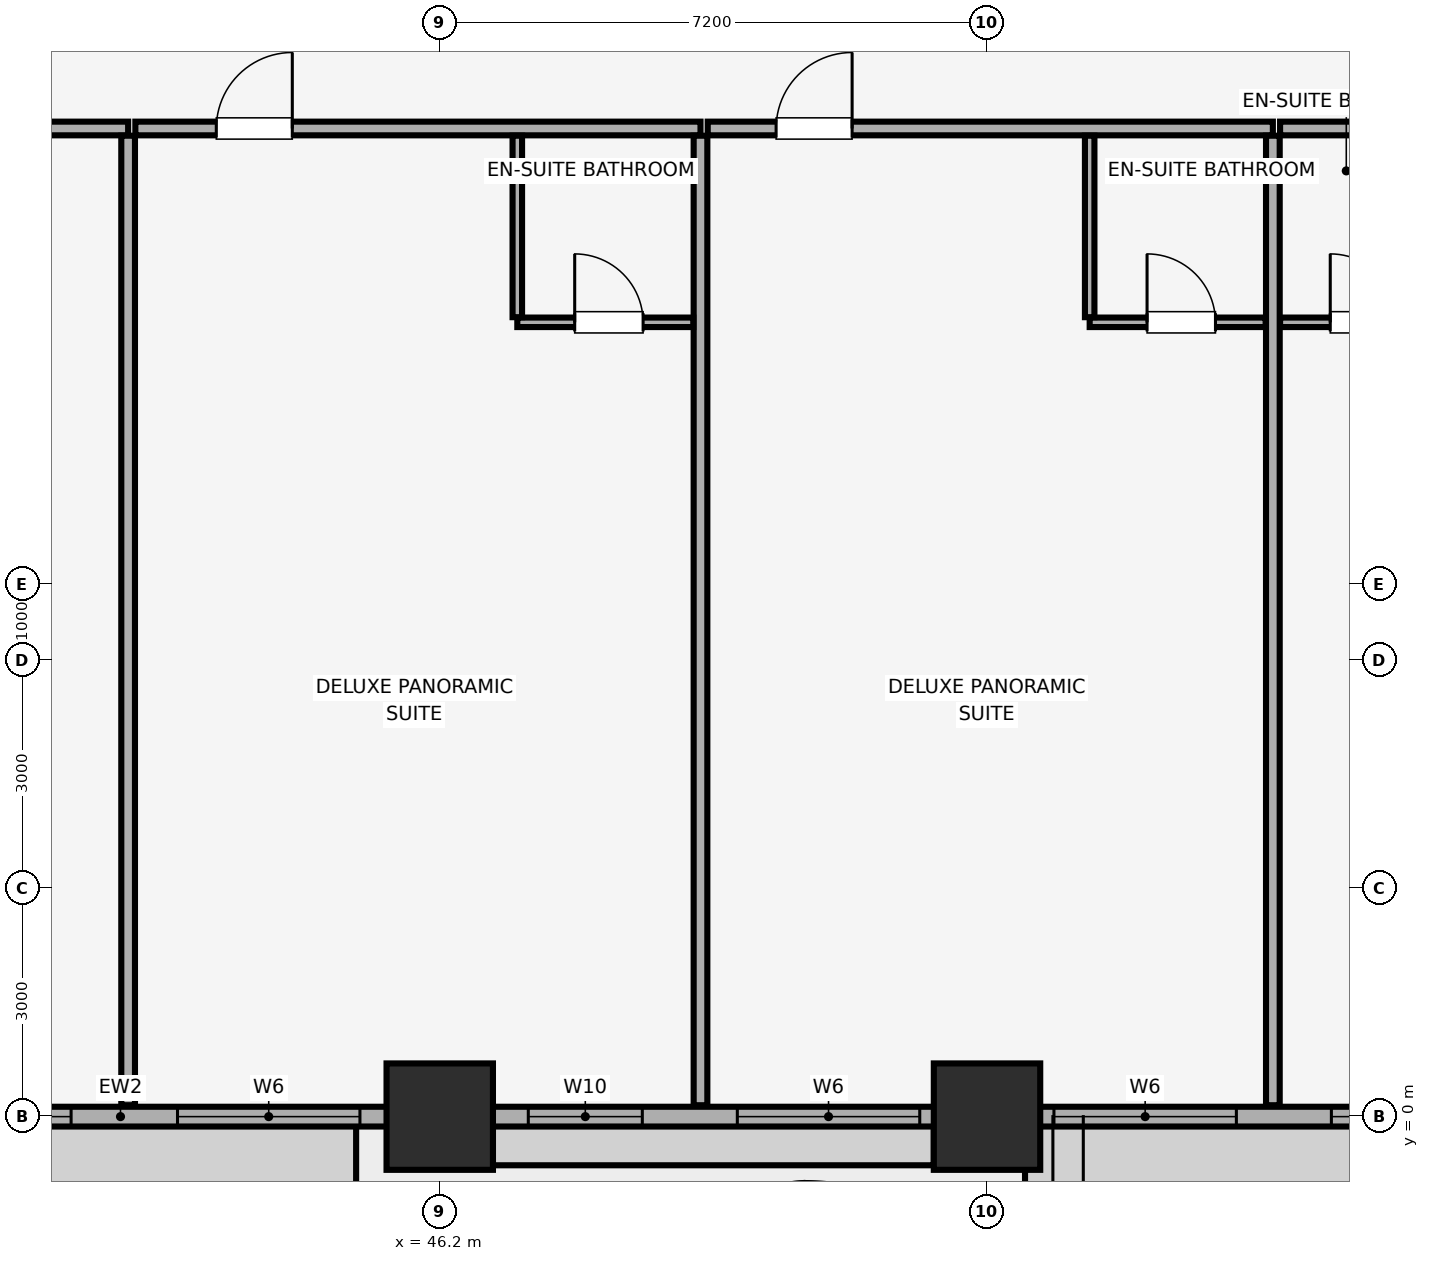
"""IFC4 building model, lengths in metres.
Left out: names, types, materials, properties, quantities, classifications, styles, units other than length and angle.
Written with IfcOpenShell. Run it as: python <this file> out.ifc"""

import sys

from ifc_helpers import new_model, si_unit, direction, frame, frame_2d, origin, origin_2d, place, context, subcontext, project, spatial, rectangle, extrude, element, fill, save


model = new_model("IFC4")
c1 = context("Model", 3, precision=1e-05, world=origin(), true_north=direction((0.0, 1.0)))
c2 = subcontext(c1, "Body", "Model", "MODEL_VIEW")
j1 = project(units=[si_unit("LENGTHUNIT", "METRE"), si_unit("PLANEANGLEUNIT", "RADIAN")], contexts=[c1])
p1 = place(None, origin())
s1 = spatial("IfcSite", under=j1, at=p1, CompositionType="ELEMENT")
p2 = place(p1, origin())
s2 = spatial("IfcBuilding", under=s1, at=p2, CompositionType="ELEMENT")
p3 = place(p2, frame((0.0, 0.0, 68.9)))
s3 = spatial("IfcBuildingStorey", under=s2, at=p3, CompositionType="ELEMENT", Elevation=68.9)
for number, where, z_axis, x_axis in (
    (1, (46.2, 0.0, 0.0), (0.0, 0.0, 1.0), (1.0, 0.0, 0.0)),
    (2, (53.4, 0.0, 0.0), (0.0, 0.0, 1.0), (1.0, 0.0, 0.0)),
):
    element("IfcColumn", number, at=place(p3, frame(where, z_axis=z_axis, x_axis=x_axis)), inside=s3, PredefinedType="COLUMN", context=c2, shape_type="SweptSolid", body=[
        extrude(rectangle(XDim=1.4, YDim=1.4, at=origin_2d()), origin(), (0.0, 0.0, 1.0), 3.51),
    ])
p4 = place(p3, frame((4.2, 0.0, 0.0), z_axis=(0.0, 0.0, 1.0), x_axis=(1.0, 0.0, 0.0)))
e3 = element("IfcWall", 3, at=p4, inside=s3, PredefinedType="SOLIDWALL", context=c2, shape_type="SweptSolid", body=[
    extrude(rectangle(XDim=75.6, YDim=0.26, at=frame_2d((37.8, 0.0))), origin(), (0.0, 0.0, 1.0), 2.56),
])
p5 = place(p4, frame((13.517, 0.0, 0.0)))
e4 = element("IfcOpeningElement", 4, at=p5, cuts=e3, PredefinedType="OPENING", context=c2, shape_type="SweptSolid", body=[
    extrude(rectangle(XDim=1.1, YDim=2.15, at=frame_2d((0.55, 1.075))), frame((0.0, 0.14, 0.0), z_axis=(0.0, -1.0, 0.0), x_axis=(1.0, 0.0, 0.0)), (0.0, 0.0, 1.0), 0.28),
])
p6 = place(p4, frame((28.183, 0.0, 0.0)))
e5 = element("IfcOpeningElement", 5, at=p6, cuts=e3, PredefinedType="OPENING", context=c2, shape_type="SweptSolid", body=[
    extrude(rectangle(XDim=1.1, YDim=2.15, at=frame_2d((0.55, 1.075))), frame((0.0, 0.14, 0.0), z_axis=(0.0, -1.0, 0.0), x_axis=(1.0, 0.0, 0.0)), (0.0, 0.0, 1.0), 0.28),
])
p7 = place(p4, frame((58.094, 0.0, 0.0)))
e6 = element("IfcOpeningElement", 6, at=p7, cuts=e3, PredefinedType="OPENING", context=c2, shape_type="SweptSolid", body=[
    extrude(rectangle(XDim=1.1, YDim=2.15, at=frame_2d((0.55, 1.075))), frame((0.0, 0.14, 0.0), z_axis=(0.0, -1.0, 0.0), x_axis=(1.0, 0.0, 0.0)), (0.0, 0.0, 1.0), 0.28),
])
p8 = place(p4, frame((1.035, 0.0, 0.85)))
e7 = element("IfcOpeningElement", 7, at=p8, cuts=e3, PredefinedType="OPENING", context=c2, shape_type="SweptSolid", body=[
    extrude(rectangle(XDim=2.4, YDim=1.5, at=frame_2d((1.2, 0.75))), frame((0.0, 0.14, 0.0), z_axis=(0.0, -1.0, 0.0), x_axis=(1.0, 0.0, 0.0)), (0.0, 0.0, 1.0), 0.28),
])
p9 = place(p4, frame((5.74, 0.0, 0.85)))
e8 = element("IfcOpeningElement", 8, at=p9, cuts=e3, PredefinedType="OPENING", context=c2, shape_type="SweptSolid", body=[
    extrude(rectangle(XDim=1.5, YDim=1.4, at=frame_2d((0.75, 0.7))), frame((0.0, 0.14, 0.0), z_axis=(0.0, -1.0, 0.0), x_axis=(1.0, 0.0, 0.0)), (0.0, 0.0, 1.0), 0.28),
])
p10 = place(p4, frame((8.49, 0.0, 0.85)))
e9 = element("IfcOpeningElement", 9, at=p10, cuts=e3, PredefinedType="OPENING", context=c2, shape_type="SweptSolid", body=[
    extrude(rectangle(XDim=2.4, YDim=1.5, at=frame_2d((1.2, 0.75))), frame((0.0, 0.14, 0.0), z_axis=(0.0, -1.0, 0.0), x_axis=(1.0, 0.0, 0.0)), (0.0, 0.0, 1.0), 0.28),
])
p11 = place(p4, frame((15.855, 0.0, 0.85)))
e10 = element("IfcOpeningElement", 10, at=p11, cuts=e3, PredefinedType="OPENING", context=c2, shape_type="SweptSolid", body=[
    extrude(rectangle(XDim=2.4, YDim=1.5, at=frame_2d((1.2, 0.75))), frame((0.0, 0.14, 0.0), z_axis=(0.0, -1.0, 0.0), x_axis=(1.0, 0.0, 0.0)), (0.0, 0.0, 1.0), 0.28),
])
p12 = place(p4, frame((20.02, 0.0, 0.85)))
e11 = element("IfcOpeningElement", 11, at=p12, cuts=e3, PredefinedType="OPENING", context=c2, shape_type="SweptSolid", body=[
    extrude(rectangle(XDim=2.4, YDim=1.5, at=frame_2d((1.2, 0.75))), frame((0.0, 0.14, 0.0), z_axis=(0.0, -1.0, 0.0), x_axis=(1.0, 0.0, 0.0)), (0.0, 0.0, 1.0), 0.28),
])
p13 = place(p4, frame((23.67, 0.0, 0.85)))
e12 = element("IfcOpeningElement", 12, at=p13, cuts=e3, PredefinedType="OPENING", context=c2, shape_type="SweptSolid", body=[
    extrude(rectangle(XDim=1.5, YDim=1.4, at=frame_2d((0.75, 0.7))), frame((0.0, 0.14, 0.0), z_axis=(0.0, -1.0, 0.0), x_axis=(1.0, 0.0, 0.0)), (0.0, 0.0, 1.0), 0.28),
])
p14 = place(p4, frame((31.035, 0.0, 0.85)))
e13 = element("IfcOpeningElement", 13, at=p14, cuts=e3, PredefinedType="OPENING", context=c2, shape_type="SweptSolid", body=[
    extrude(rectangle(XDim=1.5, YDim=1.4, at=frame_2d((0.75, 0.7))), frame((0.0, 0.14, 0.0), z_axis=(0.0, -1.0, 0.0), x_axis=(1.0, 0.0, 0.0)), (0.0, 0.0, 1.0), 0.28),
])
p15 = place(p4, frame((34.75, 0.0, 0.85)))
e14 = element("IfcOpeningElement", 14, at=p15, cuts=e3, PredefinedType="OPENING", context=c2, shape_type="SweptSolid", body=[
    extrude(rectangle(XDim=2.4, YDim=1.5, at=frame_2d((1.2, 0.75))), frame((0.0, 0.14, 0.0), z_axis=(0.0, -1.0, 0.0), x_axis=(1.0, 0.0, 0.0)), (0.0, 0.0, 1.0), 0.28),
])
p16 = place(p4, frame((38.55, 0.0, 0.85)))
e15 = element("IfcOpeningElement", 15, at=p16, cuts=e3, PredefinedType="OPENING", context=c2, shape_type="SweptSolid", body=[
    extrude(rectangle(XDim=2.4, YDim=1.5, at=frame_2d((1.2, 0.75))), frame((0.0, 0.14, 0.0), z_axis=(0.0, -1.0, 0.0), x_axis=(1.0, 0.0, 0.0)), (0.0, 0.0, 1.0), 0.28),
])
p17 = place(p4, frame((43.165, 0.0, 0.85)))
e16 = element("IfcOpeningElement", 16, at=p17, cuts=e3, PredefinedType="OPENING", context=c2, shape_type="SweptSolid", body=[
    extrude(rectangle(XDim=1.5, YDim=1.4, at=frame_2d((0.75, 0.7))), frame((0.0, 0.14, 0.0), z_axis=(0.0, -1.0, 0.0), x_axis=(1.0, 0.0, 0.0)), (0.0, 0.0, 1.0), 0.28),
])
p18 = place(p4, frame((45.915, 0.0, 0.85)))
e17 = element("IfcOpeningElement", 17, at=p18, cuts=e3, PredefinedType="OPENING", context=c2, shape_type="SweptSolid", body=[
    extrude(rectangle(XDim=2.4, YDim=1.5, at=frame_2d((1.2, 0.75))), frame((0.0, 0.14, 0.0), z_axis=(0.0, -1.0, 0.0), x_axis=(1.0, 0.0, 0.0)), (0.0, 0.0, 1.0), 0.28),
])
p19 = place(p4, frame((50.081, 0.0, 0.85)))
e18 = element("IfcOpeningElement", 18, at=p19, cuts=e3, PredefinedType="OPENING", context=c2, shape_type="SweptSolid", body=[
    extrude(rectangle(XDim=2.4, YDim=1.5, at=frame_2d((1.2, 0.75))), frame((0.0, 0.14, 0.0), z_axis=(0.0, -1.0, 0.0), x_axis=(1.0, 0.0, 0.0)), (0.0, 0.0, 1.0), 0.28),
])
p20 = place(p4, frame((53.73, 0.0, 0.85)))
e19 = element("IfcOpeningElement", 19, at=p20, cuts=e3, PredefinedType="OPENING", context=c2, shape_type="SweptSolid", body=[
    extrude(rectangle(XDim=1.5, YDim=1.4, at=frame_2d((0.75, 0.7))), frame((0.0, 0.14, 0.0), z_axis=(0.0, -1.0, 0.0), x_axis=(1.0, 0.0, 0.0)), (0.0, 0.0, 1.0), 0.28),
])
p21 = place(p4, frame((61.095, 0.0, 0.85)))
e20 = element("IfcOpeningElement", 20, at=p21, cuts=e3, PredefinedType="OPENING", context=c2, shape_type="SweptSolid", body=[
    extrude(rectangle(XDim=1.5, YDim=1.4, at=frame_2d((0.75, 0.7))), frame((0.0, 0.14, 0.0), z_axis=(0.0, -1.0, 0.0), x_axis=(1.0, 0.0, 0.0)), (0.0, 0.0, 1.0), 0.28),
])
p22 = place(p4, frame((64.76, 0.0, 0.85)))
e21 = element("IfcOpeningElement", 21, at=p22, cuts=e3, PredefinedType="OPENING", context=c2, shape_type="SweptSolid", body=[
    extrude(rectangle(XDim=2.4, YDim=1.5, at=frame_2d((1.2, 0.75))), frame((0.0, 0.14, 0.0), z_axis=(0.0, -1.0, 0.0), x_axis=(1.0, 0.0, 0.0)), (0.0, 0.0, 1.0), 0.28),
])
p23 = place(p4, frame((68.41, 0.0, 0.85)))
e22 = element("IfcOpeningElement", 22, at=p23, cuts=e3, PredefinedType="OPENING", context=c2, shape_type="SweptSolid", body=[
    extrude(rectangle(XDim=1.5, YDim=1.4, at=frame_2d((0.75, 0.7))), frame((0.0, 0.14, 0.0), z_axis=(0.0, -1.0, 0.0), x_axis=(1.0, 0.0, 0.0)), (0.0, 0.0, 1.0), 0.28),
])
p24 = place(p4, frame((72.165, 0.0, 0.85)))
e23 = element("IfcOpeningElement", 23, at=p24, cuts=e3, PredefinedType="OPENING", context=c2, shape_type="SweptSolid", body=[
    extrude(rectangle(XDim=2.4, YDim=1.5, at=frame_2d((1.2, 0.75))), frame((0.0, 0.14, 0.0), z_axis=(0.0, -1.0, 0.0), x_axis=(1.0, 0.0, 0.0)), (0.0, 0.0, 1.0), 0.28),
])
p25 = place(p3, frame((34.665, 13.0, 0.0), z_axis=(0.0, 0.0, 1.0), x_axis=(1.0, 0.0, 0.0)))
e24 = element("IfcWall", 24, at=p25, inside=s3, PredefinedType="PARTITIONING", context=c2, shape_type="SweptSolid", body=[
    extrude(rectangle(XDim=7.435, YDim=0.18, at=frame_2d((3.718, 0.0))), origin(), (0.0, 0.0, 1.0), 3.51),
])
p26 = place(p25, frame((5.175, 0.0, 0.0)))
e25 = element("IfcOpeningElement", 25, at=p26, cuts=e24, PredefinedType="OPENING", context=c2, shape_type="SweptSolid", body=[
    extrude(rectangle(XDim=1.0, YDim=2.15, at=frame_2d((0.5, 1.075))), frame((0.0, 0.1, 0.0), z_axis=(0.0, -1.0, 0.0), x_axis=(1.0, 0.0, 0.0)), (0.0, 0.0, 1.0), 0.2),
])
p27 = place(p3, frame((42.1, 0.15, 0.0), z_axis=(0.0, 0.0, 1.0), x_axis=(0.0, 1.0, 0.0)))
e26 = element("IfcWall", 26, at=p27, inside=s3, PredefinedType="PARTITIONING", context=c2, shape_type="SweptSolid", body=[
    extrude(rectangle(XDim=12.755, YDim=0.18, at=frame_2d((6.377, 0.0))), origin(), (0.0, 0.0, 1.0), 2.898),
])
p28 = place(p3, frame((42.195, 13.0, 0.0), z_axis=(0.0, 0.0, 1.0), x_axis=(1.0, 0.0, 0.0)))
e27 = element("IfcWall", 27, at=p28, inside=s3, PredefinedType="PARTITIONING", context=c2, shape_type="SweptSolid", body=[
    extrude(rectangle(XDim=7.435, YDim=0.18, at=frame_2d((3.718, 0.0))), origin(), (0.0, 0.0, 1.0), 3.51),
])
p29 = place(p28, frame((1.065, 0.0, 0.0)))
e28 = element("IfcOpeningElement", 28, at=p29, cuts=e27, PredefinedType="OPENING", context=c2, shape_type="SweptSolid", body=[
    extrude(rectangle(XDim=1.0, YDim=2.15, at=frame_2d((0.5, 1.075))), frame((0.0, 0.1, 0.0), z_axis=(0.0, -1.0, 0.0), x_axis=(1.0, 0.0, 0.0)), (0.0, 0.0, 1.0), 0.2),
])
p30 = place(p3, frame((49.631, 0.15, 0.0), z_axis=(0.0, 0.0, 1.0), x_axis=(0.0, 1.0, 0.0)))
e29 = element("IfcWall", 29, at=p30, inside=s3, PredefinedType="PARTITIONING", context=c2, shape_type="SweptSolid", body=[
    extrude(rectangle(XDim=12.755, YDim=0.18, at=frame_2d((6.377, 0.0))), origin(), (0.0, 0.0, 1.0), 2.898),
])
p31 = place(p3, frame((47.22, 10.45, 0.0), z_axis=(0.0, 0.0, 1.0), x_axis=(1.0, 0.0, 0.0)))
e30 = element("IfcWall", 30, at=p31, inside=s3, PredefinedType="PARTITIONING", context=c2, shape_type="SweptSolid", body=[
    extrude(rectangle(XDim=2.315, YDim=0.125, at=frame_2d((1.157, 0.0))), origin(), (0.0, 0.0, 1.0), 3.51),
])
p32 = place(p31, frame((0.755, 0.0, 0.0)))
e31 = element("IfcOpeningElement", 31, at=p32, cuts=e30, PredefinedType="OPENING", context=c2, shape_type="SweptSolid", body=[
    extrude(rectangle(XDim=0.9, YDim=2.1, at=frame_2d((0.45, 1.05))), frame((0.0, 0.073, 0.0), z_axis=(0.0, -1.0, 0.0), x_axis=(1.0, 0.0, 0.0)), (0.0, 0.0, 1.0), 0.145),
])
p33 = place(p3, frame((47.22, 10.518, 0.0), z_axis=(0.0, 0.0, 1.0), x_axis=(0.0, 1.0, 0.0)))
e32 = element("IfcWall", 32, at=p33, inside=s3, PredefinedType="PARTITIONING", context=c2, shape_type="SweptSolid", body=[
    extrude(rectangle(XDim=2.387, YDim=0.125, at=frame_2d((1.194, 0.0))), origin(), (0.0, 0.0, 1.0), 3.51),
])
p34 = place(p3, frame((49.726, 13.0, 0.0), z_axis=(0.0, 0.0, 1.0), x_axis=(1.0, 0.0, 0.0)))
e33 = element("IfcWall", 33, at=p34, inside=s3, PredefinedType="PARTITIONING", context=c2, shape_type="SweptSolid", body=[
    extrude(rectangle(XDim=7.435, YDim=0.18, at=frame_2d((3.718, 0.0))), origin(), (0.0, 0.0, 1.0), 3.51),
])
p35 = place(p34, frame((0.9, 0.0, 0.0)))
e34 = element("IfcOpeningElement", 34, at=p35, cuts=e33, PredefinedType="OPENING", context=c2, shape_type="SweptSolid", body=[
    extrude(rectangle(XDim=1.0, YDim=2.15, at=frame_2d((0.5, 1.075))), frame((0.0, 0.1, 0.0), z_axis=(0.0, -1.0, 0.0), x_axis=(1.0, 0.0, 0.0)), (0.0, 0.0, 1.0), 0.2),
])
p36 = place(p3, frame((57.161, 0.15, 0.0), z_axis=(0.0, 0.0, 1.0), x_axis=(0.0, 1.0, 0.0)))
e35 = element("IfcWall", 35, at=p36, inside=s3, PredefinedType="PARTITIONING", context=c2, shape_type="SweptSolid", body=[
    extrude(rectangle(XDim=12.755, YDim=0.18, at=frame_2d((6.377, 0.0))), origin(), (0.0, 0.0, 1.0), 2.898),
])
p37 = place(p3, frame((54.75, 10.45, 0.0), z_axis=(0.0, 0.0, 1.0), x_axis=(1.0, 0.0, 0.0)))
e36 = element("IfcWall", 36, at=p37, inside=s3, PredefinedType="PARTITIONING", context=c2, shape_type="SweptSolid", body=[
    extrude(rectangle(XDim=2.315, YDim=0.125, at=frame_2d((1.158, 0.0))), origin(), (0.0, 0.0, 1.0), 3.51),
])
p38 = place(p37, frame((0.755, 0.0, 0.0)))
e37 = element("IfcOpeningElement", 37, at=p38, cuts=e36, PredefinedType="OPENING", context=c2, shape_type="SweptSolid", body=[
    extrude(rectangle(XDim=0.9, YDim=2.1, at=frame_2d((0.45, 1.05))), frame((0.0, 0.073, 0.0), z_axis=(0.0, -1.0, 0.0), x_axis=(1.0, 0.0, 0.0)), (0.0, 0.0, 1.0), 0.145),
])
p39 = place(p3, frame((54.75, 10.518, 0.0), z_axis=(0.0, 0.0, 1.0), x_axis=(0.0, 1.0, 0.0)))
e38 = element("IfcWall", 38, at=p39, inside=s3, PredefinedType="PARTITIONING", context=c2, shape_type="SweptSolid", body=[
    extrude(rectangle(XDim=2.387, YDim=0.125, at=frame_2d((1.194, 0.0))), origin(), (0.0, 0.0, 1.0), 3.51),
])
p40 = place(p3, frame((57.256, 13.0, 0.0), z_axis=(0.0, 0.0, 1.0), x_axis=(1.0, 0.0, 0.0)))
e39 = element("IfcWall", 39, at=p40, inside=s3, PredefinedType="PARTITIONING", context=c2, shape_type="SweptSolid", body=[
    extrude(rectangle(XDim=7.435, YDim=0.18, at=frame_2d((3.718, 0.0))), origin(), (0.0, 0.0, 1.0), 3.51),
])
p41 = place(p40, frame((5.28, 0.0, 0.0)))
e40 = element("IfcOpeningElement", 40, at=p41, cuts=e39, PredefinedType="OPENING", context=c2, shape_type="SweptSolid", body=[
    extrude(rectangle(XDim=1.0, YDim=2.15, at=frame_2d((0.5, 1.075))), frame((0.0, 0.1, 0.0), z_axis=(0.0, -1.0, 0.0), x_axis=(1.0, 0.0, 0.0)), (0.0, 0.0, 1.0), 0.2),
])
p42 = place(p3, frame((57.256, 10.45, 0.0), z_axis=(0.0, 0.0, 1.0), x_axis=(1.0, 0.0, 0.0)))
e41 = element("IfcWall", 41, at=p42, inside=s3, PredefinedType="PARTITIONING", context=c2, shape_type="SweptSolid", body=[
    extrude(rectangle(XDim=2.315, YDim=0.125, at=frame_2d((1.157, 0.0))), origin(), (0.0, 0.0, 1.0), 3.51),
])
p43 = place(p42, frame((0.66, 0.0, 0.0)))
e42 = element("IfcOpeningElement", 42, at=p43, cuts=e41, PredefinedType="OPENING", context=c2, shape_type="SweptSolid", body=[
    extrude(rectangle(XDim=0.9, YDim=2.1, at=frame_2d((0.45, 1.05))), frame((0.0, 0.073, 0.0), z_axis=(0.0, -1.0, 0.0), x_axis=(1.0, 0.0, 0.0)), (0.0, 0.0, 1.0), 0.145),
])
p44 = place(p15, origin())
e43 = element("IfcWindow", 43, at=p44, inside=s3, PartitioningType="SINGLE_PANEL", PredefinedType="WINDOW", context=c2, shape_type="SweptSolid", body=[
    extrude(rectangle(XDim=2.4, YDim=1.5, at=frame_2d((1.2, 0.75))), frame((0.0, 0.03, 0.0), z_axis=(0.0, -1.0, 0.0), x_axis=(1.0, 0.0, 0.0)), (0.0, 0.0, 1.0), 0.06),
])
fill(e14, e43)
p45 = place(p16, origin())
e44 = element("IfcWindow", 44, at=p45, inside=s3, PartitioningType="SINGLE_PANEL", PredefinedType="WINDOW", context=c2, shape_type="SweptSolid", body=[
    extrude(rectangle(XDim=2.4, YDim=1.5, at=frame_2d((1.2, 0.75))), frame((0.0, 0.03, 0.0), z_axis=(0.0, -1.0, 0.0), x_axis=(1.0, 0.0, 0.0)), (0.0, 0.0, 1.0), 0.06),
])
fill(e15, e44)
p46 = place(p17, origin())
e45 = element("IfcWindow", 45, at=p46, inside=s3, PartitioningType="SINGLE_PANEL", PredefinedType="WINDOW", context=c2, shape_type="SweptSolid", body=[
    extrude(rectangle(XDim=1.5, YDim=1.4, at=frame_2d((0.75, 0.7))), frame((0.0, 0.03, 0.0), z_axis=(0.0, -1.0, 0.0), x_axis=(1.0, 0.0, 0.0)), (0.0, 0.0, 1.0), 0.06),
])
fill(e16, e45)
p47 = place(p18, origin())
e46 = element("IfcWindow", 46, at=p47, inside=s3, PartitioningType="SINGLE_PANEL", PredefinedType="WINDOW", context=c2, shape_type="SweptSolid", body=[
    extrude(rectangle(XDim=2.4, YDim=1.5, at=frame_2d((1.2, 0.75))), frame((0.0, 0.03, 0.0), z_axis=(0.0, -1.0, 0.0), x_axis=(1.0, 0.0, 0.0)), (0.0, 0.0, 1.0), 0.06),
])
fill(e17, e46)
p48 = place(p19, origin())
e47 = element("IfcWindow", 47, at=p48, inside=s3, PartitioningType="SINGLE_PANEL", PredefinedType="WINDOW", context=c2, shape_type="SweptSolid", body=[
    extrude(rectangle(XDim=2.4, YDim=1.5, at=frame_2d((1.2, 0.75))), frame((0.0, 0.03, 0.0), z_axis=(0.0, -1.0, 0.0), x_axis=(1.0, 0.0, 0.0)), (0.0, 0.0, 1.0), 0.06),
])
fill(e18, e47)
p49 = place(p20, origin())
e48 = element("IfcWindow", 48, at=p49, inside=s3, PartitioningType="SINGLE_PANEL", PredefinedType="WINDOW", context=c2, shape_type="SweptSolid", body=[
    extrude(rectangle(XDim=1.5, YDim=1.4, at=frame_2d((0.75, 0.7))), frame((0.0, 0.03, 0.0), z_axis=(0.0, -1.0, 0.0), x_axis=(1.0, 0.0, 0.0)), (0.0, 0.0, 1.0), 0.06),
])
fill(e19, e48)
p50 = place(p29, origin())
e49 = element("IfcDoor", 49, at=p50, inside=s3, OperationType="SINGLE_SWING_RIGHT", PredefinedType="DOOR", context=c2, shape_type="SweptSolid", body=[
    extrude(rectangle(XDim=1.0, YDim=2.15, at=frame_2d((0.5, 1.075))), frame((0.0, 0.025, 0.0), z_axis=(0.0, -1.0, 0.0), x_axis=(1.0, 0.0, 0.0)), (0.0, 0.0, 1.0), 0.05),
])
fill(e28, e49)
p51 = place(p32, origin())
e50 = element("IfcDoor", 50, at=p51, inside=s3, OperationType="SINGLE_SWING_LEFT", PredefinedType="DOOR", context=c2, shape_type="SweptSolid", body=[
    extrude(rectangle(XDim=0.9, YDim=2.1, at=frame_2d((0.45, 1.05))), frame((0.0, 0.025, 0.0), z_axis=(0.0, -1.0, 0.0), x_axis=(1.0, 0.0, 0.0)), (0.0, 0.0, 1.0), 0.05),
])
fill(e31, e50)
p52 = place(p35, origin())
e51 = element("IfcDoor", 51, at=p52, inside=s3, OperationType="SINGLE_SWING_RIGHT", PredefinedType="DOOR", context=c2, shape_type="SweptSolid", body=[
    extrude(rectangle(XDim=1.0, YDim=2.15, at=frame_2d((0.5, 1.075))), frame((0.0, 0.025, 0.0), z_axis=(0.0, -1.0, 0.0), x_axis=(1.0, 0.0, 0.0)), (0.0, 0.0, 1.0), 0.05),
])
fill(e34, e51)
p53 = place(p38, origin())
e52 = element("IfcDoor", 52, at=p53, inside=s3, OperationType="SINGLE_SWING_LEFT", PredefinedType="DOOR", context=c2, shape_type="SweptSolid", body=[
    extrude(rectangle(XDim=0.9, YDim=2.1, at=frame_2d((0.45, 1.05))), frame((0.0, 0.025, 0.0), z_axis=(0.0, -1.0, 0.0), x_axis=(1.0, 0.0, 0.0)), (0.0, 0.0, 1.0), 0.05),
])
fill(e37, e52)
p54 = place(p43, origin())
e53 = element("IfcDoor", 53, at=p54, inside=s3, OperationType="SINGLE_SWING_LEFT", PredefinedType="DOOR", context=c2, shape_type="SweptSolid", body=[
    extrude(rectangle(XDim=0.9, YDim=2.1, at=frame_2d((0.45, 1.05))), frame((0.0, 0.025, 0.0), z_axis=(0.0, -1.0, 0.0), x_axis=(1.0, 0.0, 0.0)), (0.0, 0.0, 1.0), 0.05),
])
fill(e42, e53)
save(model, sys.argv[1])
